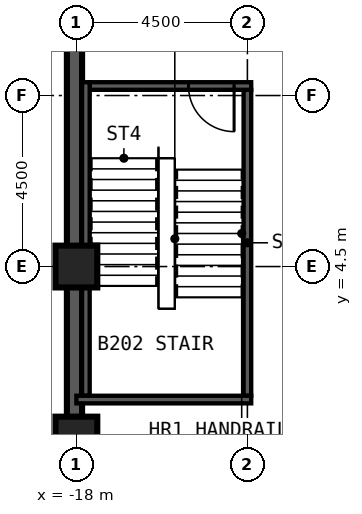
"""IFC4 building model, lengths in metres.
Left out: names, types, materials, properties, quantities, classifications, styles, units other than length and angle.
Written with IfcOpenShell. Run it as: python <this file> out.ifc"""

import sys

from ifc_helpers import new_model, si_unit, direction, frame, frame_2d, origin, origin_2d, place, context, subcontext, project, spatial, rectangle, extrude, element, fill, save


model = new_model("IFC4")
c1 = context("Model", 3, precision=1e-05, world=origin(), true_north=direction((0.0, 1.0)))
c2 = subcontext(c1, "Body", "Model", "MODEL_VIEW")
j1 = project(units=[si_unit("LENGTHUNIT", "METRE"), si_unit("PLANEANGLEUNIT", "RADIAN")], contexts=[c1])
p1 = place(None, origin())
s1 = spatial("IfcSite", under=j1, at=p1, CompositionType="ELEMENT")
p2 = place(p1, origin())
s2 = spatial("IfcBuilding", under=s1, at=p2, CompositionType="ELEMENT")
p3 = place(p2, frame((0.0, 0.0, -9.0)))
s3 = spatial("IfcBuildingStorey", under=s2, at=p3, CompositionType="ELEMENT", Elevation=-9.0)
for number, where, z_axis, x_axis in (
    (1, (-18.0, 4.5, -0.6), (0.0, 0.0, 1.0), (1.0, 0.0, 0.0)),
    (2, (-18.0, 0.0, -0.6), (0.0, 0.0, 1.0), (1.0, 0.0, 0.0)),
):
    element("IfcColumn", number, at=place(p3, frame(where, z_axis=z_axis, x_axis=x_axis)), inside=s3, PredefinedType="COLUMN", context=c2, shape_type="SweptSolid", body=[
        extrude(rectangle(XDim=1.1, YDim=1.1, at=origin_2d()), origin(), (0.0, 0.0, 1.0), 5.1),
    ])
p4 = place(p3, frame((-18.05, 40.35, -0.6), z_axis=(0.0, 0.0, 1.0), x_axis=(0.0, -1.0, 0.0)))
e3 = element("IfcWall", 3, at=p4, inside=s3, PredefinedType="SOLIDWALL", context=c2, shape_type="SweptSolid", body=[
    extrude(rectangle(XDim=53.7, YDim=0.4, at=frame_2d((26.85, 0.0))), origin(), (0.0, 0.0, 1.0), 5.1),
])
p5 = place(p3, frame((-17.65, 9.25, 0.0), z_axis=(0.0, 0.0, 1.0), x_axis=(1.0, 0.0, 0.0)))
e4 = element("IfcWall", 4, at=p5, inside=s3, PredefinedType="SOLIDWALL", context=c2, shape_type="SweptSolid", body=[
    extrude(rectangle(XDim=4.25, YDim=0.2, at=frame_2d((2.125, 0.0))), origin(), (0.0, 0.0, 1.0), 4.25),
])
p6 = place(p5, frame((3.8, 0.0, 0.0), z_axis=(0.0, 0.0, 1.0), x_axis=(-1.0, 0.0, 0.0)))
e5 = element("IfcOpeningElement", 5, at=p6, cuts=e4, PredefinedType="OPENING", context=c2, shape_type="SweptSolid", body=[
    extrude(rectangle(XDim=1.2, YDim=2.1, at=frame_2d((0.6, 1.05))), frame((0.0, 0.11, 0.0), z_axis=(0.0, -1.0, 0.0), x_axis=(1.0, 0.0, 0.0)), (0.0, 0.0, 1.0), 0.22),
])
p7 = place(p3, frame((-18.0, 1.0, 0.0), z_axis=(0.0, 0.0, 1.0), x_axis=(1.0, 0.0, 0.0)))
e6 = element("IfcWall", 6, at=p7, inside=s3, PredefinedType="SOLIDWALL", context=c2, shape_type="SweptSolid", body=[
    extrude(rectangle(XDim=4.6, YDim=0.2, at=frame_2d((2.3, 0.0))), origin(), (0.0, 0.0, 1.0), 4.25),
])
p8 = place(p3, frame((-13.5, 1.1, 0.0), z_axis=(0.0, 0.0, 1.0), x_axis=(0.0, 1.0, 0.0)))
e7 = element("IfcWall", 7, at=p8, inside=s3, PredefinedType="SOLIDWALL", context=c2, shape_type="SweptSolid", body=[
    extrude(rectangle(XDim=8.05, YDim=0.2, at=frame_2d((4.025, 0.0))), origin(), (0.0, 0.0, 1.0), 4.25),
])
p9 = place(p3, frame((-17.75, 1.1, 0.0), z_axis=(0.0, 0.0, 1.0), x_axis=(0.0, 1.0, 0.0)))
e8 = element("IfcWall", 8, at=p9, inside=s3, PredefinedType="SOLIDWALL", context=c2, shape_type="SweptSolid", body=[
    extrude(rectangle(XDim=2.85, YDim=0.2, at=frame_2d((1.425, 0.0))), origin(), (0.0, 0.0, 1.0), 4.25),
])
p10 = place(p3, frame((-17.75, 5.05, 0.0), z_axis=(0.0, 0.0, 1.0), x_axis=(0.0, 1.0, 0.0)))
e9 = element("IfcWall", 9, at=p10, inside=s3, PredefinedType="SOLIDWALL", context=c2, shape_type="SweptSolid", body=[
    extrude(rectangle(XDim=4.3, YDim=0.2, at=frame_2d((2.15, 0.0))), origin(), (0.0, 0.0, 1.0), 4.25),
])
p11 = place(p6, origin())
e10 = element("IfcDoor", 10, at=p11, inside=s3, OperationType="SINGLE_SWING_LEFT", PredefinedType="DOOR", context=c2, shape_type="SweptSolid", body=[
    extrude(rectangle(XDim=1.2, YDim=2.1, at=frame_2d((0.6, 1.05))), frame((0.0, 0.025, 0.0), z_axis=(0.0, -1.0, 0.0), x_axis=(1.0, 0.0, 0.0)), (0.0, 0.0, 1.0), 0.05),
])
fill(e5, e10)
save(model, sys.argv[1])
